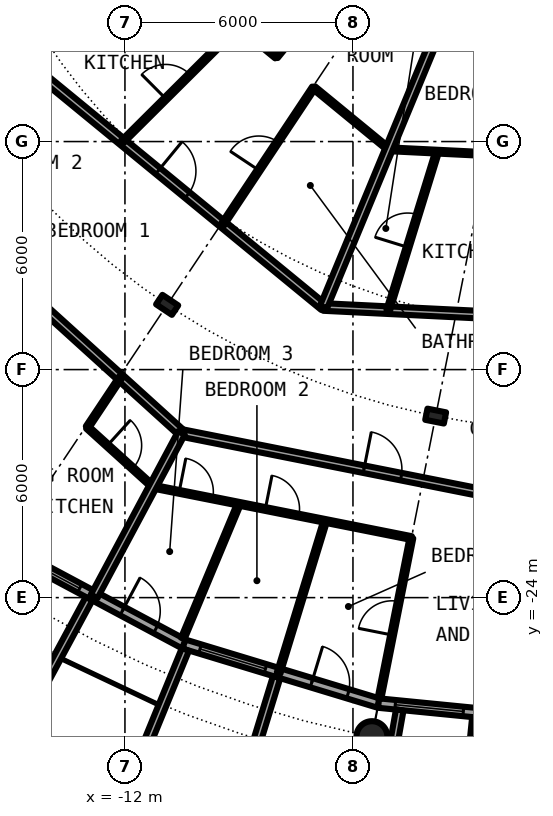
"""IFC4 building model, lengths in metres.
Left out: names, types, materials, properties, quantities, classifications, styles, units other than length and angle.
Written with IfcOpenShell. Run it as: python <this file> out.ifc"""

import sys

from ifc_helpers import new_model, si_unit, direction, frame, frame_2d, origin, origin_2d, place, context, subcontext, project, spatial, rectangle, hollow_circle, i_section, extrude, element, fill, save


model = new_model("IFC4")
c1 = context("Model", 3, precision=1e-05, world=origin(), true_north=direction((0.0, 1.0)))
c2 = subcontext(c1, "Body", "Model", "MODEL_VIEW")
j1 = project(units=[si_unit("LENGTHUNIT", "METRE"), si_unit("PLANEANGLEUNIT", "RADIAN")], contexts=[c1])
p1 = place(None, origin())
s1 = spatial("IfcSite", under=j1, at=p1, CompositionType="ELEMENT")
p2 = place(p1, origin())
s2 = spatial("IfcBuilding", under=s1, at=p2, CompositionType="ELEMENT")
p3 = place(p2, frame((0.0, 0.0, 151.3)))
s3 = spatial("IfcBuildingStorey", under=s2, at=p3, CompositionType="ELEMENT", Elevation=151.3)
p4 = place(p3, frame((-5.501, -27.658, 0.0), z_axis=(0.0, 0.0, 1.0), x_axis=(1.0, 0.0, 0.0)))
e1 = element("IfcColumn", 1, at=p4, inside=s3, PredefinedType="COLUMN", context=c2, shape_type="SweptSolid", body=[
    extrude(hollow_circle(Radius=0.406, WallThickness=0.04, at=origin_2d()), origin(), (0.0, 0.0, 1.0), 3.05),
])
for number, where, z_axis, x_axis in (
    (2, (-10.889, -16.297, 0.0), (0.0, 0.0, 1.0), (-0.556, -0.831, 0.0)),
    (3, (-3.824, -19.223, 0.0), (0.0, 0.0, 1.0), (-0.195, -0.981, 0.0)),
):
    element("IfcColumn", number, at=place(p3, frame(where, z_axis=z_axis, x_axis=x_axis)), inside=s3, PredefinedType="COLUMN", context=c2, shape_type="SweptSolid", body=[
        extrude(i_section(OverallWidth=0.3, OverallDepth=0.5, WebThickness=0.014, FlangeThickness=0.028, FilletRadius=0.027, at=origin_2d()), origin(), (0.0, 0.0, 1.0), 3.05),
    ])
p5 = place(p3, frame((-15.167, -22.699, 0.0), z_axis=(0.0, 0.0, 1.0), x_axis=(0.881915646801, -0.471407246368, 0.0)))
e4 = element("IfcWall", 4, at=p5, inside=s3, PredefinedType="SOLIDWALL", context=c2, shape_type="SweptSolid", body=[
    extrude(rectangle(XDim=5.352, YDim=0.25, at=frame_2d((2.676, 0.0))), origin(), (0.0, 0.0, 1.0), 2.7),
])
p6 = place(p5, frame((0.441, 0.0, 0.3)))
e5 = element("IfcOpeningElement", 5, at=p6, cuts=e4, PredefinedType="OPENING", context=c2, shape_type="SweptSolid", body=[
    extrude(rectangle(XDim=1.8, YDim=2.1, at=frame_2d((0.9, 1.05))), frame((0.0, 0.135, 0.0), z_axis=(0.0, -1.0, 0.0), x_axis=(1.0, 0.0, 0.0)), (0.0, 0.0, 1.0), 0.27),
])
p7 = place(p5, frame((3.51, 0.0, 0.0)))
e6 = element("IfcOpeningElement", 6, at=p7, cuts=e4, PredefinedType="OPENING", context=c2, shape_type="SweptSolid", body=[
    extrude(rectangle(XDim=1.0, YDim=2.2, at=frame_2d((0.5, 1.1))), frame((0.0, 0.135, 0.0), z_axis=(0.0, -1.0, 0.0), x_axis=(1.0, 0.0, 0.0)), (0.0, 0.0, 1.0), 0.27),
])
p8 = place(p3, frame((-12.945, -24.029, -0.03), z_axis=(0.0, 0.0, 1.0), x_axis=(-0.474424310775, -0.88029629861, 0.0)))
e7 = element("IfcWall", 7, at=p8, inside=s3, PredefinedType="SOLIDWALL", context=c2, shape_type="SweptSolid", body=[
    extrude(rectangle(XDim=3.006, YDim=0.2, at=frame_2d((1.503, 0.0))), origin(), (0.0, 0.0, 1.0), 2.73),
])
p9 = place(p3, frame((-10.447, -25.222, 0.0), z_axis=(0.0, 0.0, 1.0), x_axis=(0.956965678721, -0.290201119486, 0.0)))
e8 = element("IfcWall", 8, at=p9, inside=s3, PredefinedType="SOLIDWALL", context=c2, shape_type="SweptSolid", body=[
    extrude(rectangle(XDim=5.351, YDim=0.25, at=frame_2d((2.676, 0.0))), origin(), (0.0, 0.0, 1.0), 2.7),
])
p10 = place(p9, frame((0.441, 0.0, 0.3)))
e9 = element("IfcOpeningElement", 9, at=p10, cuts=e8, PredefinedType="OPENING", context=c2, shape_type="SweptSolid", body=[
    extrude(rectangle(XDim=1.8, YDim=2.1, at=frame_2d((0.9, 1.05))), frame((0.0, 0.135, 0.0), z_axis=(0.0, -1.0, 0.0), x_axis=(1.0, 0.0, 0.0)), (0.0, 0.0, 1.0), 0.27),
])
p11 = place(p9, frame((3.51, 0.0, 0.0)))
e10 = element("IfcOpeningElement", 10, at=p11, cuts=e8, PredefinedType="OPENING", context=c2, shape_type="SweptSolid", body=[
    extrude(rectangle(XDim=1.0, YDim=2.2, at=frame_2d((0.5, 1.1))), frame((0.0, 0.135, 0.0), z_axis=(0.0, -1.0, 0.0), x_axis=(1.0, 0.0, 0.0)), (0.0, 0.0, 1.0), 0.27),
])
p12 = place(p3, frame((-10.409, -25.364, -0.03), z_axis=(0.0, 0.0, 1.0), x_axis=(-0.379509886562, -0.925187681501, 0.0)))
e11 = element("IfcWall", 11, at=p12, inside=s3, PredefinedType="SOLIDWALL", context=c2, shape_type="SweptSolid", body=[
    extrude(rectangle(XDim=2.883, YDim=0.2, at=frame_2d((1.441, 0.0))), origin(), (0.0, 0.0, 1.0), 2.73),
])
p13 = place(p3, frame((-8.009, -26.092, -0.03), z_axis=(0.0, 0.0, 1.0), x_axis=(-0.293406695073, -0.955987715029, 0.0)))
e12 = element("IfcWall", 12, at=p13, inside=s3, PredefinedType="SOLIDWALL", context=c2, shape_type="SweptSolid", body=[
    extrude(rectangle(XDim=3.006, YDim=0.2, at=frame_2d((1.503, 0.0))), origin(), (0.0, 0.0, 1.0), 2.73),
])
p14 = place(p3, frame((-5.326, -26.775, 0.0), z_axis=(0.0, 0.0, 1.0), x_axis=(0.995173996315, -0.098126026407, 0.0)))
e13 = element("IfcWall", 13, at=p14, inside=s3, PredefinedType="SOLIDWALL", context=c2, shape_type="SweptSolid", body=[
    extrude(rectangle(XDim=5.352, YDim=0.25, at=frame_2d((2.676, 0.0))), origin(), (0.0, 0.0, 1.0), 2.7),
])
p15 = place(p14, frame((0.441, 0.0, 0.3)))
e14 = element("IfcOpeningElement", 14, at=p15, cuts=e13, PredefinedType="OPENING", context=c2, shape_type="SweptSolid", body=[
    extrude(rectangle(XDim=1.8, YDim=2.1, at=frame_2d((0.9, 1.05))), frame((0.0, 0.135, 0.0), z_axis=(0.0, -1.0, 0.0), x_axis=(1.0, 0.0, 0.0)), (0.0, 0.0, 1.0), 0.27),
])
p16 = place(p14, frame((3.51, 0.0, 0.0)))
e15 = element("IfcOpeningElement", 15, at=p16, cuts=e13, PredefinedType="OPENING", context=c2, shape_type="SweptSolid", body=[
    extrude(rectangle(XDim=1.0, YDim=2.2, at=frame_2d((0.5, 1.1))), frame((0.0, 0.135, 0.0), z_axis=(0.0, -1.0, 0.0), x_axis=(1.0, 0.0, 0.0)), (0.0, 0.0, 1.0), 0.27),
])
p17 = place(p3, frame((-4.769, -26.956, -0.03), z_axis=(0.0, 0.0, 1.0), x_axis=(-0.174056778901, -0.984735618183, 0.0)))
e16 = element("IfcWall", 16, at=p17, inside=s3, PredefinedType="SOLIDWALL", context=c2, shape_type="SweptSolid", body=[
    extrude(rectangle(XDim=2.925, YDim=0.2, at=frame_2d((1.462, 0.0))), origin(), (0.0, 0.0, 1.0), 2.73),
])
p18 = place(p3, frame((-2.764, -27.153, -0.03), z_axis=(0.0, 0.0, 1.0), x_axis=(-0.101505487237, -0.994834979311, 0.0)))
e17 = element("IfcWall", 17, at=p18, inside=s3, PredefinedType="SOLIDWALL", context=c2, shape_type="SweptSolid", body=[
    extrude(rectangle(XDim=3.007, YDim=0.2, at=frame_2d((1.503, 0.0))), origin(), (0.0, 0.0, 1.0), 2.73),
])
p19 = place(p3, frame((-12.988, -19.518, 0.0), z_axis=(0.0, 0.0, 1.0), x_axis=(0.741132356378, -0.671358942988, 0.0)))
e18 = element("IfcWall", 18, at=p19, inside=s3, PredefinedType="PARTITIONING", context=c2, shape_type="SweptSolid", body=[
    extrude(rectangle(XDim=2.323, YDim=0.1, at=frame_2d((1.162, 0.0))), origin(), (0.0, 0.0, 1.0), 2.7),
])
p20 = place(p19, frame((0.712, 0.0, 0.0)))
e19 = element("IfcOpeningElement", 19, at=p20, cuts=e18, PredefinedType="OPENING", context=c2, shape_type="SweptSolid", body=[
    extrude(rectangle(XDim=0.9, YDim=2.3, at=frame_2d((0.45, 1.15))), frame((0.0, 0.06, 0.0), z_axis=(0.0, -1.0, 0.0), x_axis=(1.0, 0.0, 0.0)), (0.0, 0.0, 1.0), 0.12),
])
p21 = place(p3, frame((-11.264, -21.08, 0.0), z_axis=(0.0, 0.0, 1.0), x_axis=(0.980795304313, -0.195039921651, 0.0)))
e20 = element("IfcWall", 20, at=p21, inside=s3, PredefinedType="PARTITIONING", context=c2, shape_type="SweptSolid", body=[
    extrude(rectangle(XDim=6.937, YDim=0.1, at=frame_2d((3.469, 0.0))), origin(), (0.0, 0.0, 1.0), 2.7),
])
p22 = place(p21, frame((3.016, 0.0, 0.0)))
e21 = element("IfcOpeningElement", 21, at=p22, cuts=e20, PredefinedType="OPENING", context=c2, shape_type="SweptSolid", body=[
    extrude(rectangle(XDim=0.9, YDim=2.3, at=frame_2d((0.45, 1.15))), frame((0.0, 0.06, 0.0), z_axis=(0.0, -1.0, 0.0), x_axis=(1.0, 0.0, 0.0)), (0.0, 0.0, 1.0), 0.12),
])
p23 = place(p21, frame((0.704, 0.0, 0.0)))
e22 = element("IfcOpeningElement", 22, at=p23, cuts=e20, PredefinedType="OPENING", context=c2, shape_type="SweptSolid", body=[
    extrude(rectangle(XDim=0.9, YDim=2.3, at=frame_2d((0.45, 1.15))), frame((0.0, 0.06, 0.0), z_axis=(0.0, -1.0, 0.0), x_axis=(1.0, 0.0, 0.0)), (0.0, 0.0, 1.0), 0.12),
])
p24 = place(p3, frame((-18.542, -12.389, 0.0), z_axis=(0.0, 0.0, 1.0), x_axis=(0.740979597636, -0.671527539188, 0.0)))
e23 = element("IfcWall", 23, at=p24, inside=s3, PredefinedType="PARTITIONING", context=c2, shape_type="SweptSolid", body=[
    extrude(rectangle(XDim=10.841, YDim=0.2, at=frame_2d((5.42, 0.0))), origin(), (0.0, 0.0, 1.0), 2.7),
])
p25 = place(p24, frame((3.835, 0.0, 0.0)))
e24 = element("IfcOpeningElement", 24, at=p25, cuts=e23, PredefinedType="OPENING", context=c2, shape_type="SweptSolid", body=[
    extrude(rectangle(XDim=1.0, YDim=2.3, at=frame_2d((0.5, 1.15))), frame((0.0, 0.11, 0.0), z_axis=(0.0, -1.0, 0.0), x_axis=(1.0, 0.0, 0.0)), (0.0, 0.0, 1.0), 0.22),
])
p26 = place(p3, frame((-10.512, -19.667, 0.0), z_axis=(0.0, 0.0, 1.0), x_axis=(0.980780341017, -0.195115152343, 0.0)))
e25 = element("IfcWall", 25, at=p26, inside=s3, PredefinedType="PARTITIONING", context=c2, shape_type="SweptSolid", body=[
    extrude(rectangle(XDim=12.947, YDim=0.2, at=frame_2d((6.473, 0.0))), origin(), (0.0, 0.0, 1.0), 2.7),
])
p27 = place(p26, frame((4.894, 0.0, 0.0)))
e26 = element("IfcOpeningElement", 26, at=p27, cuts=e25, PredefinedType="OPENING", context=c2, shape_type="SweptSolid", body=[
    extrude(rectangle(XDim=1.0, YDim=2.3, at=frame_2d((0.5, 1.15))), frame((0.0, 0.11, 0.0), z_axis=(0.0, -1.0, 0.0), x_axis=(1.0, 0.0, 0.0)), (0.0, 0.0, 1.0), 0.22),
])
p28 = place(p3, frame((-14.717, -9.834, 0.0), z_axis=(0.0, 0.0, 1.0), x_axis=(0.773034536097, -0.634363938131, 0.0)))
e27 = element("IfcWall", 27, at=p28, inside=s3, PredefinedType="PARTITIONING", context=c2, shape_type="SweptSolid", body=[
    extrude(rectangle(XDim=10.277, YDim=0.2, at=frame_2d((5.138, 0.0))), origin(), (0.0, 0.0, 1.0), 2.7),
])
p29 = place(p28, frame((4.638, 0.0, 0.0)))
e28 = element("IfcOpeningElement", 28, at=p29, cuts=e27, PredefinedType="OPENING", context=c2, shape_type="SweptSolid", body=[
    extrude(rectangle(XDim=1.0, YDim=2.3, at=frame_2d((0.5, 1.15))), frame((0.0, 0.11, 0.0), z_axis=(0.0, -1.0, 0.0), x_axis=(1.0, 0.0, 0.0)), (0.0, 0.0, 1.0), 0.22),
])
p30 = place(p3, frame((-6.778, -16.353, 0.0), z_axis=(0.0, 0.0, 1.0), x_axis=(0.998797244, -0.049031269395, 0.0)))
e29 = element("IfcWall", 29, at=p30, inside=s3, PredefinedType="PARTITIONING", context=c2, shape_type="SweptSolid", body=[
    extrude(rectangle(XDim=11.93, YDim=0.2, at=frame_2d((5.965, 0.0))), origin(), (0.0, 0.0, 1.0), 2.7),
])
p31 = place(p30, frame((6.321, 0.0, 0.0)))
e30 = element("IfcOpeningElement", 30, at=p31, cuts=e29, PredefinedType="OPENING", context=c2, shape_type="SweptSolid", body=[
    extrude(rectangle(XDim=1.0, YDim=2.3, at=frame_2d((0.5, 1.15))), frame((0.0, 0.11, 0.0), z_axis=(0.0, -1.0, 0.0), x_axis=(1.0, 0.0, 0.0)), (0.0, 0.0, 1.0), 0.22),
])
p32 = place(p3, frame((-8.839, -9.098, 0.0), z_axis=(0.0, 0.0, 1.0), x_axis=(0.7731800648, -0.634186555673, 0.0)))
e31 = element("IfcWall", 31, at=p32, inside=s3, PredefinedType="PARTITIONING", context=c2, shape_type="SweptSolid", body=[
    extrude(rectangle(XDim=1.064, YDim=0.1, at=frame_2d((0.532, 0.0))), origin(), (0.0, 0.0, 1.0), 2.7),
])
p33 = place(p3, frame((-7.031, -10.582, 0.0), z_axis=(0.0, 0.0, 1.0), x_axis=(0.772943675046, -0.634474645046, 0.0)))
e32 = element("IfcWall", 32, at=p33, inside=s3, PredefinedType="PARTITIONING", context=c2, shape_type="SweptSolid", body=[
    extrude(rectangle(XDim=2.557, YDim=0.1, at=frame_2d((1.278, 0.0))), origin(), (0.0, 0.0, 1.0), 2.7),
])
p34 = place(p3, frame((-5.06, -12.203, 0.0), z_axis=(0.0, 0.0, 1.0), x_axis=(0.998784958727, -0.049280891026, 0.0)))
e33 = element("IfcWall", 33, at=p34, inside=s3, PredefinedType="PARTITIONING", context=c2, shape_type="SweptSolid", body=[
    extrude(rectangle(XDim=3.82, YDim=0.1, at=frame_2d((1.91, 0.0))), origin(), (0.0, 0.0, 1.0), 2.7),
])
p35 = place(p3, frame((-12.988, -19.518, 0.0), z_axis=(0.0, 0.0, 1.0), x_axis=(0.554125989098, 0.832432813028, 0.0)))
e34 = element("IfcWall", 34, at=p35, inside=s3, PredefinedType="PARTITIONING", context=c2, shape_type="SweptSolid", body=[
    extrude(rectangle(XDim=1.57, YDim=0.1, at=frame_2d((0.785, 0.0))), origin(), (0.0, 0.0, 1.0), 2.7),
])
p36 = place(p3, frame((-12.81, -23.966, 0.0), z_axis=(0.0, 0.0, 1.0), x_axis=(0.471427642527, 0.881904744211, 0.0)))
e35 = element("IfcWall", 35, at=p36, inside=s3, PredefinedType="PARTITIONING", context=c2, shape_type="SweptSolid", body=[
    extrude(rectangle(XDim=4.875, YDim=0.2, at=frame_2d((2.438, 0.0))), origin(), (0.0, 0.0, 1.0), 2.7),
])
p37 = place(p3, frame((-12.069, -12.007, 0.0), z_axis=(0.0, 0.0, 1.0), x_axis=(0.708822693149, 0.705386695138, 0.0)))
e36 = element("IfcWall", 36, at=p37, inside=s3, PredefinedType="PARTITIONING", context=c2, shape_type="SweptSolid", body=[
    extrude(rectangle(XDim=4.121, YDim=0.1, at=frame_2d((2.061, 0.0))), origin(), (0.0, 0.0, 1.0), 2.7),
])
p38 = place(p37, frame((1.611, 0.0, 0.0)))
e37 = element("IfcOpeningElement", 37, at=p38, cuts=e36, PredefinedType="OPENING", context=c2, shape_type="SweptSolid", body=[
    extrude(rectangle(XDim=0.9, YDim=2.3, at=frame_2d((0.45, 1.15))), frame((0.0, 0.06, 0.0), z_axis=(0.0, -1.0, 0.0), x_axis=(1.0, 0.0, 0.0)), (0.0, 0.0, 1.0), 0.12),
])
p39 = place(p3, frame((-10.479, -25.073, 0.0), z_axis=(0.0, 0.0, 1.0), x_axis=(0.385572005139, 0.922677749192, 0.0)))
e38 = element("IfcWall", 38, at=p39, inside=s3, PredefinedType="PARTITIONING", context=c2, shape_type="SweptSolid", body=[
    extrude(rectangle(XDim=3.841, YDim=0.1, at=frame_2d((1.92, 0.0))), origin(), (0.0, 0.0, 1.0), 2.7),
])
p40 = place(p3, frame((-9.425, -14.177, 0.0), z_axis=(0.0, 0.0, 1.0), x_axis=(0.553865036342, 0.832606462573, 0.0)))
e39 = element("IfcWall", 39, at=p40, inside=s3, PredefinedType="PARTITIONING", context=c2, shape_type="SweptSolid", body=[
    extrude(rectangle(XDim=4.319, YDim=0.1, at=frame_2d((2.159, 0.0))), origin(), (0.0, 0.0, 1.0), 2.7),
])
p41 = place(p40, frame((1.709, 0.0, 0.0)))
e40 = element("IfcOpeningElement", 40, at=p41, cuts=e39, PredefinedType="OPENING", context=c2, shape_type="SweptSolid", body=[
    extrude(rectangle(XDim=0.9, YDim=2.3, at=frame_2d((0.45, 1.15))), frame((0.0, 0.06, 0.0), z_axis=(0.0, -1.0, 0.0), x_axis=(1.0, 0.0, 0.0)), (0.0, 0.0, 1.0), 0.12),
])
p42 = place(p3, frame((-8.019, -9.771, 0.0), z_axis=(0.0, 0.0, 1.0), x_axis=(0.634401778971, 0.773003481776, 0.0)))
e41 = element("IfcWall", 41, at=p42, inside=s3, PredefinedType="PARTITIONING", context=c2, shape_type="SweptSolid", body=[
    extrude(rectangle(XDim=4.92, YDim=0.1, at=frame_2d((2.46, 0.0))), origin(), (0.0, 0.0, 1.0), 2.7),
])
p43 = place(p42, frame((2.01, 0.0, 0.0)))
e42 = element("IfcOpeningElement", 42, at=p43, cuts=e41, PredefinedType="OPENING", context=c2, shape_type="SweptSolid", body=[
    extrude(rectangle(XDim=0.9, YDim=2.3, at=frame_2d((0.45, 1.15))), frame((0.0, 0.06, 0.0), z_axis=(0.0, -1.0, 0.0), x_axis=(1.0, 0.0, 0.0)), (0.0, 0.0, 1.0), 0.12),
])
p44 = place(p3, frame((-7.956, -25.984, 0.0), z_axis=(0.0, 0.0, 1.0), x_axis=(0.292799128207, 0.956173975028, 0.0)))
e43 = element("IfcWall", 43, at=p44, inside=s3, PredefinedType="PARTITIONING", context=c2, shape_type="SweptSolid", body=[
    extrude(rectangle(XDim=4.188, YDim=0.1, at=frame_2d((2.094, 0.0))), origin(), (0.0, 0.0, 1.0), 2.7),
])
p45 = place(p3, frame((-6.774, -16.353, 0.0), z_axis=(0.0, 0.0, 1.0), x_axis=(0.382716169203, 0.92386597179, 0.0)))
e44 = element("IfcWall", 44, at=p45, inside=s3, PredefinedType="PARTITIONING", context=c2, shape_type="SweptSolid", body=[
    extrude(rectangle(XDim=9.981, YDim=0.2, at=frame_2d((4.99, 0.0))), origin(), (0.0, 0.0, 1.0), 2.7),
])
p46 = place(p3, frame((-5.302, -26.653, 0.0), z_axis=(0.0, 0.0, 1.0), x_axis=(0.195145394338, 0.98077432423, 0.0)))
e45 = element("IfcWall", 45, at=p46, inside=s3, PredefinedType="PARTITIONING", context=c2, shape_type="SweptSolid", body=[
    extrude(rectangle(XDim=4.305, YDim=0.1, at=frame_2d((2.152, 0.0))), origin(), (0.0, 0.0, 1.0), 2.7),
])
p47 = place(p46, frame((1.702, 0.0, 0.0)))
e46 = element("IfcOpeningElement", 46, at=p47, cuts=e45, PredefinedType="OPENING", context=c2, shape_type="SweptSolid", body=[
    extrude(rectangle(XDim=0.9, YDim=2.3, at=frame_2d((0.45, 1.15))), frame((0.0, 0.06, 0.0), z_axis=(0.0, -1.0, 0.0), x_axis=(1.0, 0.0, 0.0)), (0.0, 0.0, 1.0), 0.12),
])
p48 = place(p3, frame((-5.072, -16.436, 0.0), z_axis=(0.0, 0.0, 1.0), x_axis=(0.294934866503, 0.955517359612, 0.0)))
e47 = element("IfcWall", 47, at=p48, inside=s3, PredefinedType="PARTITIONING", context=c2, shape_type="SweptSolid", body=[
    extrude(rectangle(XDim=4.364, YDim=0.1, at=frame_2d((2.182, 0.0))), origin(), (0.0, 0.0, 1.0), 2.7),
])
p49 = place(p48, frame((1.732, 0.0, 0.0)))
e48 = element("IfcOpeningElement", 48, at=p49, cuts=e47, PredefinedType="OPENING", context=c2, shape_type="SweptSolid", body=[
    extrude(rectangle(XDim=0.9, YDim=2.3, at=frame_2d((0.45, 1.15))), frame((0.0, 0.06, 0.0), z_axis=(0.0, -1.0, 0.0), x_axis=(1.0, 0.0, 0.0)), (0.0, 0.0, 1.0), 0.12),
])
p50 = place(p6, origin())
e49 = element("IfcWindow", 49, at=p50, inside=s3, PartitioningType="SINGLE_PANEL", PredefinedType="WINDOW", context=c2, shape_type="SweptSolid", body=[
    extrude(rectangle(XDim=1.8, YDim=2.1, at=frame_2d((0.9, 1.05))), frame((0.0, 0.03, 0.0), z_axis=(0.0, -1.0, 0.0), x_axis=(1.0, 0.0, 0.0)), (0.0, 0.0, 1.0), 0.06),
])
fill(e5, e49)
p51 = place(p7, origin())
e50 = element("IfcDoor", 50, at=p51, inside=s3, OperationType="SINGLE_SWING_LEFT", PredefinedType="DOOR", context=c2, shape_type="SweptSolid", body=[
    extrude(rectangle(XDim=1.0, YDim=2.2, at=frame_2d((0.5, 1.1))), frame((0.0, 0.025, 0.0), z_axis=(0.0, -1.0, 0.0), x_axis=(1.0, 0.0, 0.0)), (0.0, 0.0, 1.0), 0.05),
])
fill(e6, e50)
p52 = place(p10, origin())
e51 = element("IfcWindow", 51, at=p52, inside=s3, PartitioningType="SINGLE_PANEL", PredefinedType="WINDOW", context=c2, shape_type="SweptSolid", body=[
    extrude(rectangle(XDim=1.8, YDim=2.1, at=frame_2d((0.9, 1.05))), frame((0.0, 0.03, 0.0), z_axis=(0.0, -1.0, 0.0), x_axis=(1.0, 0.0, 0.0)), (0.0, 0.0, 1.0), 0.06),
])
fill(e9, e51)
p53 = place(p11, origin())
e52 = element("IfcDoor", 52, at=p53, inside=s3, OperationType="SINGLE_SWING_LEFT", PredefinedType="DOOR", context=c2, shape_type="SweptSolid", body=[
    extrude(rectangle(XDim=1.0, YDim=2.2, at=frame_2d((0.5, 1.1))), frame((0.0, 0.025, 0.0), z_axis=(0.0, -1.0, 0.0), x_axis=(1.0, 0.0, 0.0)), (0.0, 0.0, 1.0), 0.05),
])
fill(e10, e52)
p54 = place(p15, origin())
e53 = element("IfcWindow", 53, at=p54, inside=s3, PartitioningType="SINGLE_PANEL", PredefinedType="WINDOW", context=c2, shape_type="SweptSolid", body=[
    extrude(rectangle(XDim=1.8, YDim=2.1, at=frame_2d((0.9, 1.05))), frame((0.0, 0.03, 0.0), z_axis=(0.0, -1.0, 0.0), x_axis=(1.0, 0.0, 0.0)), (0.0, 0.0, 1.0), 0.06),
])
fill(e14, e53)
p55 = place(p20, origin())
e54 = element("IfcDoor", 54, at=p55, inside=s3, OperationType="SINGLE_SWING_RIGHT", PredefinedType="DOOR", context=c2, shape_type="SweptSolid", body=[
    extrude(rectangle(XDim=0.9, YDim=2.3, at=frame_2d((0.45, 1.15))), frame((0.0, 0.025, 0.0), z_axis=(0.0, -1.0, 0.0), x_axis=(1.0, 0.0, 0.0)), (0.0, 0.0, 1.0), 0.05),
])
fill(e19, e54)
p56 = place(p27, origin())
e55 = element("IfcDoor", 55, at=p56, inside=s3, OperationType="SINGLE_SWING_LEFT", PredefinedType="DOOR", context=c2, shape_type="SweptSolid", body=[
    extrude(rectangle(XDim=1.0, YDim=2.3, at=frame_2d((0.5, 1.15))), frame((0.0, 0.025, 0.0), z_axis=(0.0, -1.0, 0.0), x_axis=(1.0, 0.0, 0.0)), (0.0, 0.0, 1.0), 0.05),
])
fill(e26, e55)
p57 = place(p47, origin())
e56 = element("IfcDoor", 56, at=p57, inside=s3, OperationType="SINGLE_SWING_LEFT", PredefinedType="DOOR", context=c2, shape_type="SweptSolid", body=[
    extrude(rectangle(XDim=0.9, YDim=2.3, at=frame_2d((0.45, 1.15))), frame((0.0, 0.025, 0.0), z_axis=(0.0, -1.0, 0.0), x_axis=(1.0, 0.0, 0.0)), (0.0, 0.0, 1.0), 0.05),
])
fill(e46, e56)
p58 = place(p22, origin())
e57 = element("IfcDoor", 57, at=p58, inside=s3, OperationType="SINGLE_SWING_LEFT", PredefinedType="DOOR", context=c2, shape_type="SweptSolid", body=[
    extrude(rectangle(XDim=0.9, YDim=2.3, at=frame_2d((0.45, 1.15))), frame((0.0, 0.025, 0.0), z_axis=(0.0, -1.0, 0.0), x_axis=(1.0, 0.0, 0.0)), (0.0, 0.0, 1.0), 0.05),
])
fill(e21, e57)
p59 = place(p23, origin())
e58 = element("IfcDoor", 58, at=p59, inside=s3, OperationType="SINGLE_SWING_LEFT", PredefinedType="DOOR", context=c2, shape_type="SweptSolid", body=[
    extrude(rectangle(XDim=0.9, YDim=2.3, at=frame_2d((0.45, 1.15))), frame((0.0, 0.025, 0.0), z_axis=(0.0, -1.0, 0.0), x_axis=(1.0, 0.0, 0.0)), (0.0, 0.0, 1.0), 0.05),
])
fill(e22, e58)
p60 = place(p29, origin())
e59 = element("IfcDoor", 59, at=p60, inside=s3, OperationType="SINGLE_SWING_LEFT", PredefinedType="DOOR", context=c2, shape_type="SweptSolid", body=[
    extrude(rectangle(XDim=1.0, YDim=2.3, at=frame_2d((0.5, 1.15))), frame((0.0, 0.025, 0.0), z_axis=(0.0, -1.0, 0.0), x_axis=(1.0, 0.0, 0.0)), (0.0, 0.0, 1.0), 0.05),
])
fill(e28, e59)
p61 = place(p41, origin())
e60 = element("IfcDoor", 60, at=p61, inside=s3, OperationType="SINGLE_SWING_LEFT", PredefinedType="DOOR", context=c2, shape_type="SweptSolid", body=[
    extrude(rectangle(XDim=0.9, YDim=2.3, at=frame_2d((0.45, 1.15))), frame((0.0, 0.025, 0.0), z_axis=(0.0, -1.0, 0.0), x_axis=(1.0, 0.0, 0.0)), (0.0, 0.0, 1.0), 0.05),
])
fill(e40, e60)
p62 = place(p38, origin())
e61 = element("IfcDoor", 61, at=p62, inside=s3, OperationType="SINGLE_SWING_RIGHT", PredefinedType="DOOR", context=c2, shape_type="SweptSolid", body=[
    extrude(rectangle(XDim=0.9, YDim=2.3, at=frame_2d((0.45, 1.15))), frame((0.0, 0.025, 0.0), z_axis=(0.0, -1.0, 0.0), x_axis=(1.0, 0.0, 0.0)), (0.0, 0.0, 1.0), 0.05),
])
fill(e37, e61)
p63 = place(p49, origin())
e62 = element("IfcDoor", 62, at=p63, inside=s3, OperationType="SINGLE_SWING_RIGHT", PredefinedType="DOOR", context=c2, shape_type="SweptSolid", body=[
    extrude(rectangle(XDim=0.9, YDim=2.3, at=frame_2d((0.45, 1.15))), frame((0.0, 0.025, 0.0), z_axis=(0.0, -1.0, 0.0), x_axis=(1.0, 0.0, 0.0)), (0.0, 0.0, 1.0), 0.05),
])
fill(e48, e62)
save(model, sys.argv[1])
